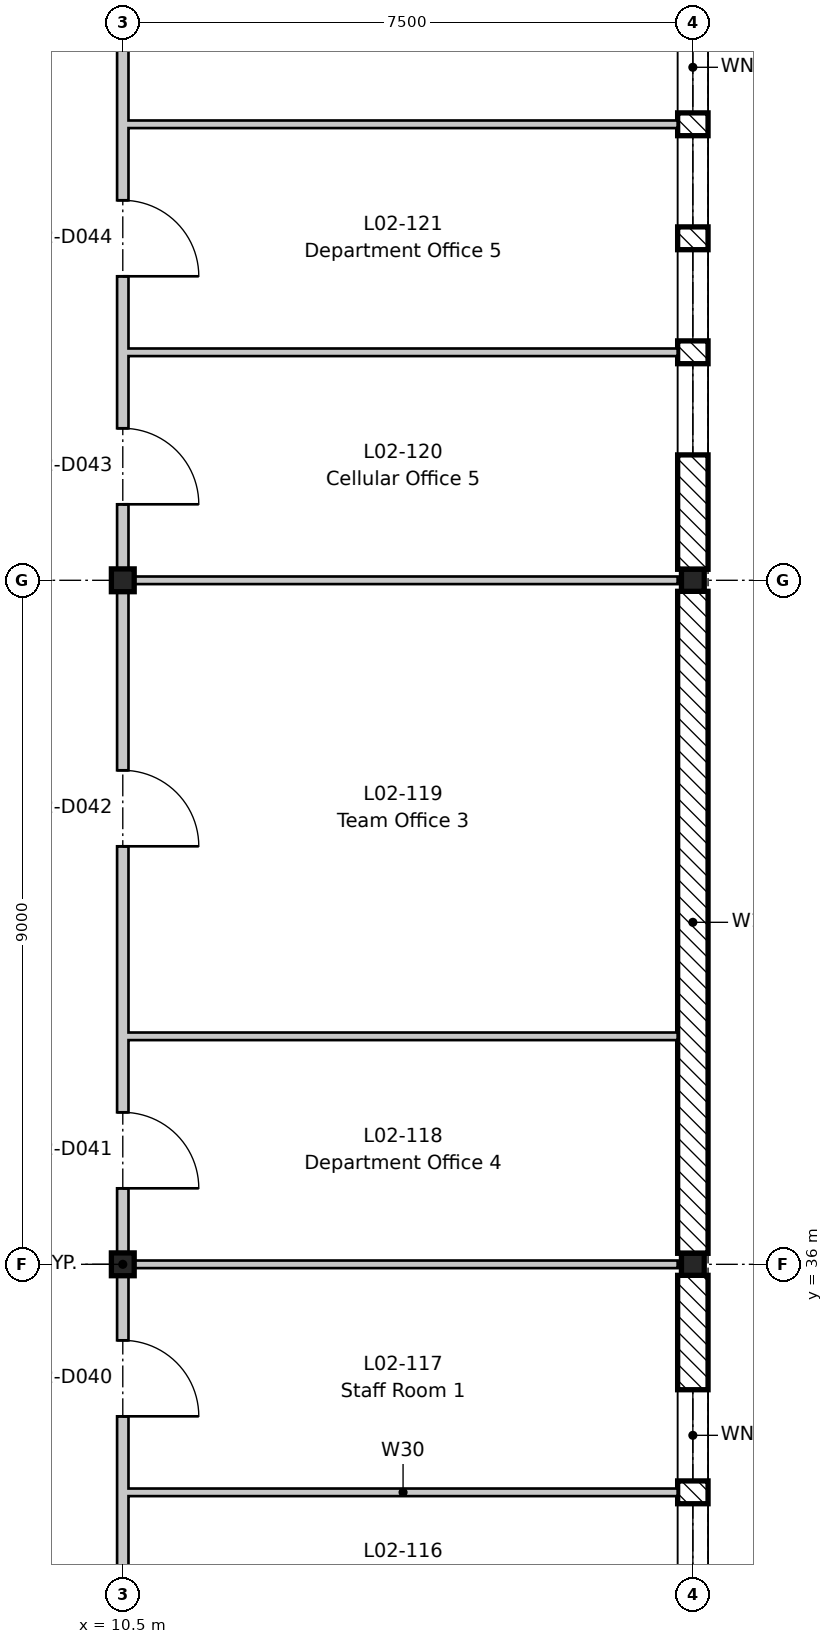
"""IFC4 building model, lengths in metres.
Left out: names, types, materials, properties, quantities, classifications, styles, units other than length and angle.
Written with IfcOpenShell. Run it as: python <this file> out.ifc"""

import sys

from ifc_helpers import new_model, si_unit, direction, frame, frame_2d, origin, origin_2d, place, context, subcontext, project, spatial, rectangle, i_section, extrude, element, fill, save


model = new_model("IFC4")
c1 = context("Model", 3, precision=1e-05, world=origin(), true_north=direction((0.0, 1.0)))
c2 = subcontext(c1, "Body", "Model", "MODEL_VIEW")
j1 = project(units=[si_unit("LENGTHUNIT", "METRE"), si_unit("PLANEANGLEUNIT", "RADIAN")], contexts=[c1])
p1 = place(None, origin())
s1 = spatial("IfcSite", under=j1, at=p1, CompositionType="ELEMENT")
p2 = place(p1, origin())
s2 = spatial("IfcBuilding", under=s1, at=p2, CompositionType="ELEMENT")
p3 = place(p2, frame((0.0, 0.0, 9.9)))
s3 = spatial("IfcBuildingStorey", under=s2, at=p3, CompositionType="ELEMENT", Elevation=9.9)
for number, where, z_axis, x_axis in (
    (1, (10.5, 36.0, -0.2), (0.0, 0.0, 1.0), (1.0, 0.0, 0.0)),
    (2, (10.5, 45.0, -0.2), (0.0, 0.0, 1.0), (1.0, 0.0, 0.0)),
):
    element("IfcColumn", number, at=place(p3, frame(where, z_axis=z_axis, x_axis=x_axis)), inside=s3, PredefinedType="COLUMN", context=c2, shape_type="SweptSolid", body=[
        extrude(i_section(OverallWidth=0.3, OverallDepth=0.3, WebThickness=0.011, FlangeThickness=0.019, FilletRadius=0.027, at=origin_2d()), origin(), (0.0, 0.0, 1.0), 4.5),
    ])
for number, where, z_axis, x_axis in (
    (3, (18.0, 36.0, -0.2), (0.0, 0.0, 1.0), (1.0, 0.0, 0.0)),
    (4, (18.0, 45.0, -0.2), (0.0, 0.0, 1.0), (1.0, 0.0, 0.0)),
):
    element("IfcColumn", number, at=place(p3, frame(where, z_axis=z_axis, x_axis=x_axis)), inside=s3, PredefinedType="COLUMN", context=c2, shape_type="SweptSolid", body=[
        extrude(i_section(OverallWidth=0.3, OverallDepth=0.29, WebThickness=0.009, FlangeThickness=0.014, FilletRadius=0.027, at=origin_2d()), origin(), (0.0, 0.0, 1.0), 4.5),
    ])
p4 = place(p3, frame((18.0, 35.855, 0.0), z_axis=(0.0, 0.0, 1.0), x_axis=(0.0, -1.0, 0.0)))
e5 = element("IfcWall", 5, at=p4, inside=s3, PredefinedType="STANDARD", context=c2, shape_type="SweptSolid", body=[
    extrude(rectangle(XDim=8.71, YDim=0.4, at=frame_2d((4.355, 0.0))), origin(), (0.0, 0.0, 1.0), 3.9),
])
p5 = place(p4, frame((6.005, 0.0, 0.6)))
e6 = element("IfcOpeningElement", 6, at=p5, cuts=e5, PredefinedType="OPENING", context=c2, shape_type="SweptSolid", body=[
    extrude(rectangle(XDim=1.2, YDim=3.0, at=frame_2d((0.6, 1.5))), frame((0.0, 0.21, 0.0), z_axis=(0.0, -1.0, 0.0), x_axis=(1.0, 0.0, 0.0)), (0.0, 0.0, 1.0), 0.42),
])
p6 = place(p4, frame((4.505, 0.0, 0.6)))
e7 = element("IfcOpeningElement", 7, at=p6, cuts=e5, PredefinedType="OPENING", context=c2, shape_type="SweptSolid", body=[
    extrude(rectangle(XDim=1.2, YDim=3.0, at=frame_2d((0.6, 1.5))), frame((0.0, 0.21, 0.0), z_axis=(0.0, -1.0, 0.0), x_axis=(1.0, 0.0, 0.0)), (0.0, 0.0, 1.0), 0.42),
])
p7 = place(p4, frame((3.005, 0.0, 0.6)))
e8 = element("IfcOpeningElement", 8, at=p7, cuts=e5, PredefinedType="OPENING", context=c2, shape_type="SweptSolid", body=[
    extrude(rectangle(XDim=1.2, YDim=3.0, at=frame_2d((0.6, 1.5))), frame((0.0, 0.21, 0.0), z_axis=(0.0, -1.0, 0.0), x_axis=(1.0, 0.0, 0.0)), (0.0, 0.0, 1.0), 0.42),
])
p8 = place(p4, frame((1.505, 0.0, 0.6)))
e9 = element("IfcOpeningElement", 9, at=p8, cuts=e5, PredefinedType="OPENING", context=c2, shape_type="SweptSolid", body=[
    extrude(rectangle(XDim=1.2, YDim=3.0, at=frame_2d((0.6, 1.5))), frame((0.0, 0.21, 0.0), z_axis=(0.0, -1.0, 0.0), x_axis=(1.0, 0.0, 0.0)), (0.0, 0.0, 1.0), 0.42),
])
p9 = place(p3, frame((18.0, 44.855, 0.0), z_axis=(0.0, 0.0, 1.0), x_axis=(0.0, -1.0, 0.0)))
e10 = element("IfcWall", 10, at=p9, inside=s3, PredefinedType="STANDARD", context=c2, shape_type="SweptSolid", body=[
    extrude(rectangle(XDim=8.71, YDim=0.4, at=frame_2d((4.355, 0.0))), origin(), (0.0, 0.0, 1.0), 3.9),
])
p10 = place(p3, frame((18.0, 53.855, 0.0), z_axis=(0.0, 0.0, 1.0), x_axis=(0.0, -1.0, 0.0)))
e11 = element("IfcWall", 11, at=p10, inside=s3, PredefinedType="STANDARD", context=c2, shape_type="SweptSolid", body=[
    extrude(rectangle(XDim=8.71, YDim=0.4, at=frame_2d((4.355, 0.0))), origin(), (0.0, 0.0, 1.0), 3.9),
])
p11 = place(p10, frame((6.005, 0.0, 0.6)))
e12 = element("IfcOpeningElement", 12, at=p11, cuts=e11, PredefinedType="OPENING", context=c2, shape_type="SweptSolid", body=[
    extrude(rectangle(XDim=1.2, YDim=3.0, at=frame_2d((0.6, 1.5))), frame((0.0, 0.21, 0.0), z_axis=(0.0, -1.0, 0.0), x_axis=(1.0, 0.0, 0.0)), (0.0, 0.0, 1.0), 0.42),
])
p12 = place(p10, frame((4.505, 0.0, 0.6)))
e13 = element("IfcOpeningElement", 13, at=p12, cuts=e11, PredefinedType="OPENING", context=c2, shape_type="SweptSolid", body=[
    extrude(rectangle(XDim=1.2, YDim=3.0, at=frame_2d((0.6, 1.5))), frame((0.0, 0.21, 0.0), z_axis=(0.0, -1.0, 0.0), x_axis=(1.0, 0.0, 0.0)), (0.0, 0.0, 1.0), 0.42),
])
p13 = place(p10, frame((3.005, 0.0, 0.6)))
e14 = element("IfcOpeningElement", 14, at=p13, cuts=e11, PredefinedType="OPENING", context=c2, shape_type="SweptSolid", body=[
    extrude(rectangle(XDim=1.2, YDim=3.0, at=frame_2d((0.6, 1.5))), frame((0.0, 0.21, 0.0), z_axis=(0.0, -1.0, 0.0), x_axis=(1.0, 0.0, 0.0)), (0.0, 0.0, 1.0), 0.42),
])
p14 = place(p10, frame((1.505, 0.0, 0.6)))
e15 = element("IfcOpeningElement", 15, at=p14, cuts=e11, PredefinedType="OPENING", context=c2, shape_type="SweptSolid", body=[
    extrude(rectangle(XDim=1.2, YDim=3.0, at=frame_2d((0.6, 1.5))), frame((0.0, 0.21, 0.0), z_axis=(0.0, -1.0, 0.0), x_axis=(1.0, 0.0, 0.0)), (0.0, 0.0, 1.0), 0.42),
])
p15 = place(p3, frame((10.575, 33.0, 0.0), z_axis=(0.0, 0.0, 1.0), x_axis=(1.0, 0.0, 0.0)))
e16 = element("IfcWall", 16, at=p15, inside=s3, PredefinedType="PARTITIONING", context=c2, shape_type="SweptSolid", body=[
    extrude(rectangle(XDim=7.225, YDim=0.1, at=frame_2d((3.613, 0.0))), origin(), (0.0, 0.0, 1.0), 4.3),
])
p16 = place(p3, frame((10.575, 36.0, 0.0), z_axis=(0.0, 0.0, 1.0), x_axis=(1.0, 0.0, 0.0)))
e17 = element("IfcWall", 17, at=p16, inside=s3, PredefinedType="PARTITIONING", context=c2, shape_type="SweptSolid", body=[
    extrude(rectangle(XDim=7.225, YDim=0.1, at=frame_2d((3.613, 0.0))), origin(), (0.0, 0.0, 1.0), 3.95),
])
p17 = place(p3, frame((10.575, 39.0, 0.0), z_axis=(0.0, 0.0, 1.0), x_axis=(1.0, 0.0, 0.0)))
e18 = element("IfcWall", 18, at=p17, inside=s3, PredefinedType="PARTITIONING", context=c2, shape_type="SweptSolid", body=[
    extrude(rectangle(XDim=7.225, YDim=0.1, at=frame_2d((3.613, 0.0))), origin(), (0.0, 0.0, 1.0), 4.3),
])
p18 = place(p3, frame((10.575, 45.0, 0.0), z_axis=(0.0, 0.0, 1.0), x_axis=(1.0, 0.0, 0.0)))
e19 = element("IfcWall", 19, at=p18, inside=s3, PredefinedType="PARTITIONING", context=c2, shape_type="SweptSolid", body=[
    extrude(rectangle(XDim=7.225, YDim=0.1, at=frame_2d((3.613, 0.0))), origin(), (0.0, 0.0, 1.0), 3.95),
])
for number, where, z_axis, x_axis in (
    (20, (10.575, 48.0, 0.0), (0.0, 0.0, 1.0), (1.0, 0.0, 0.0)),
    (21, (10.575, 51.0, 0.0), (0.0, 0.0, 1.0), (1.0, 0.0, 0.0)),
):
    element("IfcWall", number, at=place(p3, frame(where, z_axis=z_axis, x_axis=x_axis)), inside=s3, PredefinedType="PARTITIONING", context=c2, shape_type="SweptSolid", body=[
        extrude(rectangle(XDim=7.225, YDim=0.1, at=frame_2d((3.613, 0.0))), origin(), (0.0, 0.0, 1.0), 4.3),
    ])
p19 = place(p3, frame((10.5, -8.8, 0.0), z_axis=(0.0, 0.0, 1.0), x_axis=(0.0, 1.0, 0.0)))
e22 = element("IfcWall", 22, at=p19, inside=s3, PredefinedType="PARTITIONING", context=c2, shape_type="SweptSolid", body=[
    extrude(rectangle(XDim=79.3, YDim=0.15, at=frame_2d((39.65, 0.0))), origin(), (0.0, 0.0, 1.0), 3.78),
])
p20 = place(p19, frame((0.8, 0.0, 0.0)))
e23 = element("IfcOpeningElement", 23, at=p20, cuts=e22, PredefinedType="OPENING", context=c2, shape_type="SweptSolid", body=[
    extrude(rectangle(XDim=1.0, YDim=2.1, at=frame_2d((0.5, 1.05))), frame((0.0, 0.085, 0.0), z_axis=(0.0, -1.0, 0.0), x_axis=(1.0, 0.0, 0.0)), (0.0, 0.0, 1.0), 0.17),
])
p21 = place(p19, frame((5.3, 0.0, 0.0)))
e24 = element("IfcOpeningElement", 24, at=p21, cuts=e22, PredefinedType="OPENING", context=c2, shape_type="SweptSolid", body=[
    extrude(rectangle(XDim=1.0, YDim=2.1, at=frame_2d((0.5, 1.05))), frame((0.0, 0.085, 0.0), z_axis=(0.0, -1.0, 0.0), x_axis=(1.0, 0.0, 0.0)), (0.0, 0.0, 1.0), 0.17),
])
p22 = place(p19, frame((9.8, 0.0, 0.0)))
e25 = element("IfcOpeningElement", 25, at=p22, cuts=e22, PredefinedType="OPENING", context=c2, shape_type="SweptSolid", body=[
    extrude(rectangle(XDim=1.0, YDim=2.1, at=frame_2d((0.5, 1.05))), frame((0.0, 0.085, 0.0), z_axis=(0.0, -1.0, 0.0), x_axis=(1.0, 0.0, 0.0)), (0.0, 0.0, 1.0), 0.17),
])
p23 = place(p19, frame((12.8, 0.0, 0.0)))
e26 = element("IfcOpeningElement", 26, at=p23, cuts=e22, PredefinedType="OPENING", context=c2, shape_type="SweptSolid", body=[
    extrude(rectangle(XDim=1.0, YDim=2.1, at=frame_2d((0.5, 1.05))), frame((0.0, 0.085, 0.0), z_axis=(0.0, -1.0, 0.0), x_axis=(1.0, 0.0, 0.0)), (0.0, 0.0, 1.0), 0.17),
])
p24 = place(p19, frame((15.8, 0.0, 0.0)))
e27 = element("IfcOpeningElement", 27, at=p24, cuts=e22, PredefinedType="OPENING", context=c2, shape_type="SweptSolid", body=[
    extrude(rectangle(XDim=1.0, YDim=2.1, at=frame_2d((0.5, 1.05))), frame((0.0, 0.085, 0.0), z_axis=(0.0, -1.0, 0.0), x_axis=(1.0, 0.0, 0.0)), (0.0, 0.0, 1.0), 0.17),
])
p25 = place(p19, frame((20.3, 0.0, 0.0)))
e28 = element("IfcOpeningElement", 28, at=p25, cuts=e22, PredefinedType="OPENING", context=c2, shape_type="SweptSolid", body=[
    extrude(rectangle(XDim=1.0, YDim=2.1, at=frame_2d((0.5, 1.05))), frame((0.0, 0.085, 0.0), z_axis=(0.0, -1.0, 0.0), x_axis=(1.0, 0.0, 0.0)), (0.0, 0.0, 1.0), 0.17),
])
p26 = place(p19, frame((24.8, 0.0, 0.0)))
e29 = element("IfcOpeningElement", 29, at=p26, cuts=e22, PredefinedType="OPENING", context=c2, shape_type="SweptSolid", body=[
    extrude(rectangle(XDim=1.0, YDim=2.1, at=frame_2d((0.5, 1.05))), frame((0.0, 0.085, 0.0), z_axis=(0.0, -1.0, 0.0), x_axis=(1.0, 0.0, 0.0)), (0.0, 0.0, 1.0), 0.17),
])
p27 = place(p19, frame((27.8, 0.0, 0.0)))
e30 = element("IfcOpeningElement", 30, at=p27, cuts=e22, PredefinedType="OPENING", context=c2, shape_type="SweptSolid", body=[
    extrude(rectangle(XDim=1.0, YDim=2.1, at=frame_2d((0.5, 1.05))), frame((0.0, 0.085, 0.0), z_axis=(0.0, -1.0, 0.0), x_axis=(1.0, 0.0, 0.0)), (0.0, 0.0, 1.0), 0.17),
])
p28 = place(p19, frame((32.3, 0.0, 0.0)))
e31 = element("IfcOpeningElement", 31, at=p28, cuts=e22, PredefinedType="OPENING", context=c2, shape_type="SweptSolid", body=[
    extrude(rectangle(XDim=1.0, YDim=2.1, at=frame_2d((0.5, 1.05))), frame((0.0, 0.085, 0.0), z_axis=(0.0, -1.0, 0.0), x_axis=(1.0, 0.0, 0.0)), (0.0, 0.0, 1.0), 0.17),
])
p29 = place(p19, frame((38.3, 0.0, 0.0)))
e32 = element("IfcOpeningElement", 32, at=p29, cuts=e22, PredefinedType="OPENING", context=c2, shape_type="SweptSolid", body=[
    extrude(rectangle(XDim=1.0, YDim=2.1, at=frame_2d((0.5, 1.05))), frame((0.0, 0.085, 0.0), z_axis=(0.0, -1.0, 0.0), x_axis=(1.0, 0.0, 0.0)), (0.0, 0.0, 1.0), 0.17),
])
p30 = place(p19, frame((42.8, 0.0, 0.0)))
e33 = element("IfcOpeningElement", 33, at=p30, cuts=e22, PredefinedType="OPENING", context=c2, shape_type="SweptSolid", body=[
    extrude(rectangle(XDim=1.0, YDim=2.1, at=frame_2d((0.5, 1.05))), frame((0.0, 0.085, 0.0), z_axis=(0.0, -1.0, 0.0), x_axis=(1.0, 0.0, 0.0)), (0.0, 0.0, 1.0), 0.17),
])
p31 = place(p19, frame((45.8, 0.0, 0.0)))
e34 = element("IfcOpeningElement", 34, at=p31, cuts=e22, PredefinedType="OPENING", context=c2, shape_type="SweptSolid", body=[
    extrude(rectangle(XDim=1.0, YDim=2.1, at=frame_2d((0.5, 1.05))), frame((0.0, 0.085, 0.0), z_axis=(0.0, -1.0, 0.0), x_axis=(1.0, 0.0, 0.0)), (0.0, 0.0, 1.0), 0.17),
])
p32 = place(p19, frame((50.3, 0.0, 0.0)))
e35 = element("IfcOpeningElement", 35, at=p32, cuts=e22, PredefinedType="OPENING", context=c2, shape_type="SweptSolid", body=[
    extrude(rectangle(XDim=1.0, YDim=2.1, at=frame_2d((0.5, 1.05))), frame((0.0, 0.085, 0.0), z_axis=(0.0, -1.0, 0.0), x_axis=(1.0, 0.0, 0.0)), (0.0, 0.0, 1.0), 0.17),
])
p33 = place(p19, frame((54.8, 0.0, 0.0)))
e36 = element("IfcOpeningElement", 36, at=p33, cuts=e22, PredefinedType="OPENING", context=c2, shape_type="SweptSolid", body=[
    extrude(rectangle(XDim=1.0, YDim=2.1, at=frame_2d((0.5, 1.05))), frame((0.0, 0.085, 0.0), z_axis=(0.0, -1.0, 0.0), x_axis=(1.0, 0.0, 0.0)), (0.0, 0.0, 1.0), 0.17),
])
p34 = place(p19, frame((57.8, 0.0, 0.0)))
e37 = element("IfcOpeningElement", 37, at=p34, cuts=e22, PredefinedType="OPENING", context=c2, shape_type="SweptSolid", body=[
    extrude(rectangle(XDim=1.0, YDim=2.1, at=frame_2d((0.5, 1.05))), frame((0.0, 0.085, 0.0), z_axis=(0.0, -1.0, 0.0), x_axis=(1.0, 0.0, 0.0)), (0.0, 0.0, 1.0), 0.17),
])
p35 = place(p19, frame((63.6, 0.0, 0.0)))
e38 = element("IfcOpeningElement", 38, at=p35, cuts=e22, PredefinedType="OPENING", context=c2, shape_type="SweptSolid", body=[
    extrude(rectangle(XDim=1.4, YDim=2.1, at=frame_2d((0.7, 1.05))), frame((0.0, 0.085, 0.0), z_axis=(0.0, -1.0, 0.0), x_axis=(1.0, 0.0, 0.0)), (0.0, 0.0, 1.0), 0.17),
])
p36 = place(p19, frame((69.8, 0.0, 0.0)))
e39 = element("IfcOpeningElement", 39, at=p36, cuts=e22, PredefinedType="OPENING", context=c2, shape_type="SweptSolid", body=[
    extrude(rectangle(XDim=1.0, YDim=2.1, at=frame_2d((0.5, 1.05))), frame((0.0, 0.085, 0.0), z_axis=(0.0, -1.0, 0.0), x_axis=(1.0, 0.0, 0.0)), (0.0, 0.0, 1.0), 0.17),
])
p37 = place(p19, frame((72.8, 0.0, 0.0)))
e40 = element("IfcOpeningElement", 40, at=p37, cuts=e22, PredefinedType="OPENING", context=c2, shape_type="SweptSolid", body=[
    extrude(rectangle(XDim=1.0, YDim=2.1, at=frame_2d((0.5, 1.05))), frame((0.0, 0.085, 0.0), z_axis=(0.0, -1.0, 0.0), x_axis=(1.0, 0.0, 0.0)), (0.0, 0.0, 1.0), 0.17),
])
p38 = place(p7, origin())
e41 = element("IfcWindow", 41, at=p38, inside=s3, PartitioningType="SINGLE_PANEL", PredefinedType="WINDOW", context=c2, shape_type="SweptSolid", body=[
    extrude(rectangle(XDim=1.2, YDim=3.0, at=frame_2d((0.6, 1.5))), frame((0.0, 0.03, 0.0), z_axis=(0.0, -1.0, 0.0), x_axis=(1.0, 0.0, 0.0)), (0.0, 0.0, 1.0), 0.06),
])
fill(e8, e41)
p39 = place(p8, origin())
e42 = element("IfcWindow", 42, at=p39, inside=s3, PartitioningType="SINGLE_PANEL", PredefinedType="WINDOW", context=c2, shape_type="SweptSolid", body=[
    extrude(rectangle(XDim=1.2, YDim=3.0, at=frame_2d((0.6, 1.5))), frame((0.0, 0.03, 0.0), z_axis=(0.0, -1.0, 0.0), x_axis=(1.0, 0.0, 0.0)), (0.0, 0.0, 1.0), 0.06),
])
fill(e9, e42)
p40 = place(p11, origin())
e43 = element("IfcWindow", 43, at=p40, inside=s3, PartitioningType="SINGLE_PANEL", PredefinedType="WINDOW", context=c2, shape_type="SweptSolid", body=[
    extrude(rectangle(XDim=1.2, YDim=3.0, at=frame_2d((0.6, 1.5))), frame((0.0, 0.03, 0.0), z_axis=(0.0, -1.0, 0.0), x_axis=(1.0, 0.0, 0.0)), (0.0, 0.0, 1.0), 0.06),
])
fill(e12, e43)
p41 = place(p12, origin())
e44 = element("IfcWindow", 44, at=p41, inside=s3, PartitioningType="SINGLE_PANEL", PredefinedType="WINDOW", context=c2, shape_type="SweptSolid", body=[
    extrude(rectangle(XDim=1.2, YDim=3.0, at=frame_2d((0.6, 1.5))), frame((0.0, 0.03, 0.0), z_axis=(0.0, -1.0, 0.0), x_axis=(1.0, 0.0, 0.0)), (0.0, 0.0, 1.0), 0.06),
])
fill(e13, e44)
p42 = place(p13, origin())
e45 = element("IfcWindow", 45, at=p42, inside=s3, PartitioningType="SINGLE_PANEL", PredefinedType="WINDOW", context=c2, shape_type="SweptSolid", body=[
    extrude(rectangle(XDim=1.2, YDim=3.0, at=frame_2d((0.6, 1.5))), frame((0.0, 0.03, 0.0), z_axis=(0.0, -1.0, 0.0), x_axis=(1.0, 0.0, 0.0)), (0.0, 0.0, 1.0), 0.06),
])
fill(e14, e45)
p43 = place(p14, origin())
e46 = element("IfcWindow", 46, at=p43, inside=s3, PartitioningType="SINGLE_PANEL", PredefinedType="WINDOW", context=c2, shape_type="SweptSolid", body=[
    extrude(rectangle(XDim=1.2, YDim=3.0, at=frame_2d((0.6, 1.5))), frame((0.0, 0.03, 0.0), z_axis=(0.0, -1.0, 0.0), x_axis=(1.0, 0.0, 0.0)), (0.0, 0.0, 1.0), 0.06),
])
fill(e15, e46)
p44 = place(p30, frame((1.0, 0.0, 0.0), z_axis=(0.0, 0.0, 1.0), x_axis=(-1.0, 0.0, 0.0)))
e47 = element("IfcDoor", 47, at=p44, inside=s3, OperationType="SINGLE_SWING_RIGHT", PredefinedType="DOOR", context=c2, shape_type="SweptSolid", body=[
    extrude(rectangle(XDim=1.0, YDim=2.1, at=frame_2d((0.5, 1.05))), frame((0.0, 0.025, 0.0), z_axis=(0.0, -1.0, 0.0), x_axis=(1.0, 0.0, 0.0)), (0.0, 0.0, 1.0), 0.05),
])
fill(e33, e47)
p45 = place(p31, frame((1.0, 0.0, 0.0), z_axis=(0.0, 0.0, 1.0), x_axis=(-1.0, 0.0, 0.0)))
e48 = element("IfcDoor", 48, at=p45, inside=s3, OperationType="SINGLE_SWING_RIGHT", PredefinedType="DOOR", context=c2, shape_type="SweptSolid", body=[
    extrude(rectangle(XDim=1.0, YDim=2.1, at=frame_2d((0.5, 1.05))), frame((0.0, 0.025, 0.0), z_axis=(0.0, -1.0, 0.0), x_axis=(1.0, 0.0, 0.0)), (0.0, 0.0, 1.0), 0.05),
])
fill(e34, e48)
p46 = place(p32, frame((1.0, 0.0, 0.0), z_axis=(0.0, 0.0, 1.0), x_axis=(-1.0, 0.0, 0.0)))
e49 = element("IfcDoor", 49, at=p46, inside=s3, OperationType="SINGLE_SWING_RIGHT", PredefinedType="DOOR", context=c2, shape_type="SweptSolid", body=[
    extrude(rectangle(XDim=1.0, YDim=2.1, at=frame_2d((0.5, 1.05))), frame((0.0, 0.025, 0.0), z_axis=(0.0, -1.0, 0.0), x_axis=(1.0, 0.0, 0.0)), (0.0, 0.0, 1.0), 0.05),
])
fill(e35, e49)
p47 = place(p33, frame((1.0, 0.0, 0.0), z_axis=(0.0, 0.0, 1.0), x_axis=(-1.0, 0.0, 0.0)))
e50 = element("IfcDoor", 50, at=p47, inside=s3, OperationType="SINGLE_SWING_RIGHT", PredefinedType="DOOR", context=c2, shape_type="SweptSolid", body=[
    extrude(rectangle(XDim=1.0, YDim=2.1, at=frame_2d((0.5, 1.05))), frame((0.0, 0.025, 0.0), z_axis=(0.0, -1.0, 0.0), x_axis=(1.0, 0.0, 0.0)), (0.0, 0.0, 1.0), 0.05),
])
fill(e36, e50)
p48 = place(p34, frame((1.0, 0.0, 0.0), z_axis=(0.0, 0.0, 1.0), x_axis=(-1.0, 0.0, 0.0)))
e51 = element("IfcDoor", 51, at=p48, inside=s3, OperationType="SINGLE_SWING_RIGHT", PredefinedType="DOOR", context=c2, shape_type="SweptSolid", body=[
    extrude(rectangle(XDim=1.0, YDim=2.1, at=frame_2d((0.5, 1.05))), frame((0.0, 0.025, 0.0), z_axis=(0.0, -1.0, 0.0), x_axis=(1.0, 0.0, 0.0)), (0.0, 0.0, 1.0), 0.05),
])
fill(e37, e51)
save(model, sys.argv[1])
